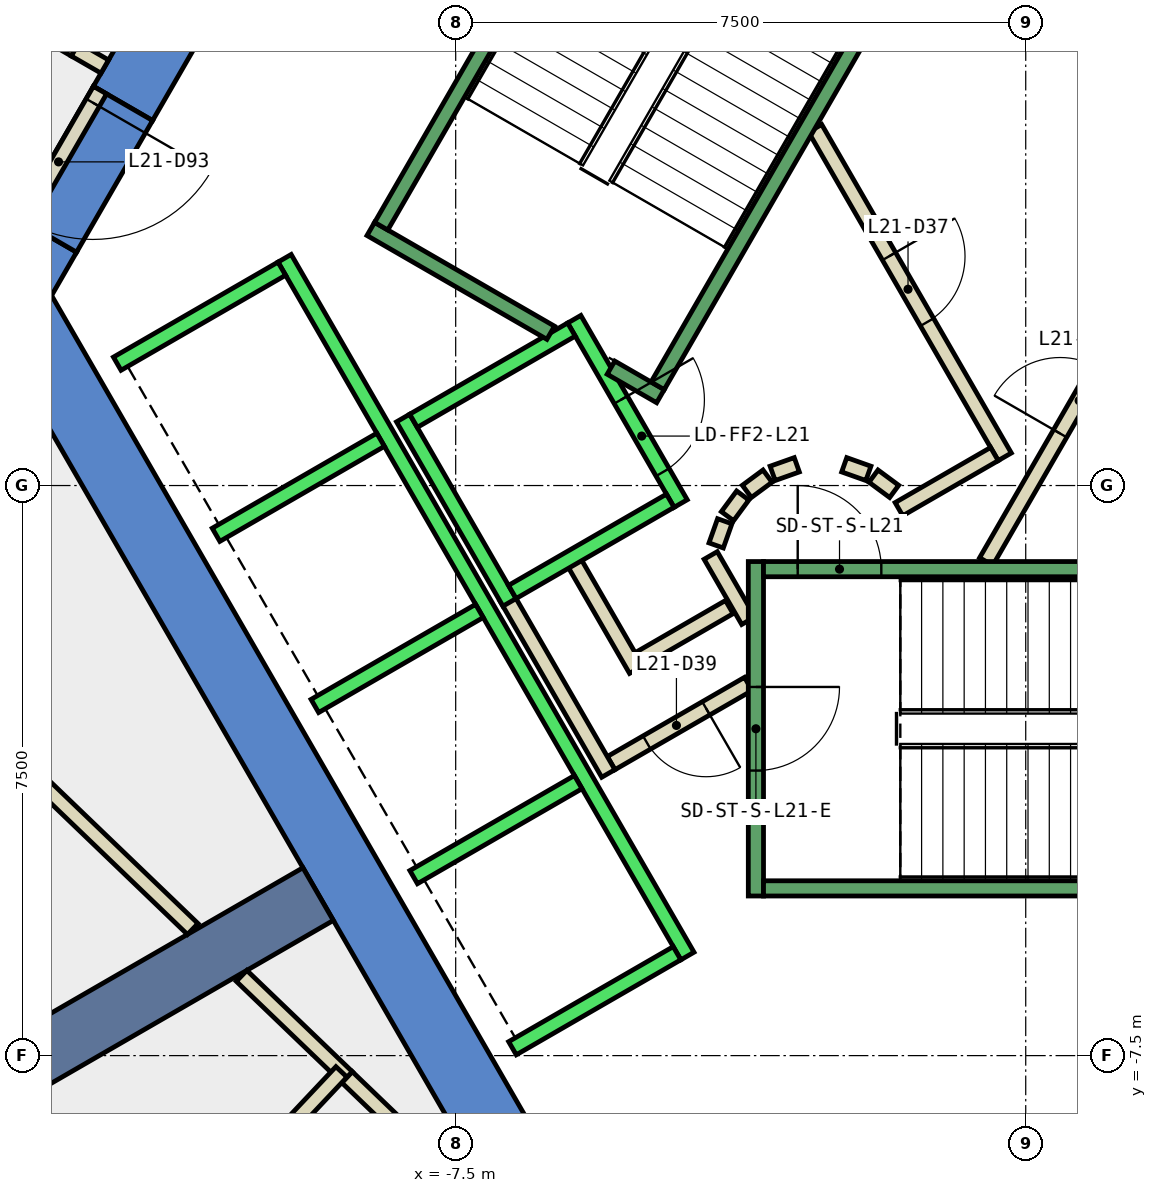
"""IFC4 building model, lengths in metres.
Left out: names, types, materials, properties, quantities, classifications, styles, units other than length and angle.
Written with IfcOpenShell. Run it as: python <this file> out.ifc"""

import sys

from ifc_helpers import new_model, si_unit, direction, frame, frame_2d, origin, place, context, subcontext, project, spatial, polyline, rectangle, outline, extrude, element, fill, save


model = new_model("IFC4")
c1 = context("Model", 3, precision=1e-05, world=origin(), true_north=direction((0.0, 1.0)))
c2 = subcontext(c1, "Body", "Model", "MODEL_VIEW")
j1 = project(units=[si_unit("LENGTHUNIT", "METRE"), si_unit("PLANEANGLEUNIT", "RADIAN")], contexts=[c1])
p1 = place(None, origin())
s1 = spatial("IfcSite", under=j1, at=p1, CompositionType="ELEMENT")
p2 = place(p1, origin())
s2 = spatial("IfcBuilding", under=s1, at=p2, CompositionType="ELEMENT")
p3 = place(p2, frame((0.0, 0.0, 99.2)))
s3 = spatial("IfcBuildingStorey", under=s2, at=p3, CompositionType="ELEMENT", Elevation=99.2)
p4 = place(p3, frame((0.0, 0.0, -0.4)))
e1 = element("IfcWall", 1, at=p4, inside=s3, PredefinedType="SHEAR", context=c2, shape_type="SweptSolid", body=[
    extrude(outline(polyline([(-12.267, 5.252), (-11.488, 4.802), (-6.409, 13.6), (-6.928, 14.5), (-12.267, 5.252)])), origin(), (0.0, 0.0, 1.0), 4.2),
])
p5 = place(p3, frame((0.0, 0.0, -0.4)))
e2 = element("IfcWall", 2, at=p5, inside=s3, PredefinedType="SHEAR", context=c2, shape_type="SweptSolid", body=[
    extrude(outline(polyline([(-12.488, 3.07), (-13.267, 3.52), (-13.856, 2.5), (-12.817, 2.5), (-12.488, 3.07)])), origin(), (0.0, 0.0, 1.0), 4.2),
])
p6 = place(p3, frame((0.0, 0.0, 3.6)))
e3 = element("IfcWall", 3, at=p6, inside=s3, PredefinedType="SHEAR", context=c2, shape_type="SweptSolid", body=[
    extrude(outline(polyline([(-13.267, 3.52), (-12.488, 3.07), (-11.488, 4.802), (-12.267, 5.252), (-13.267, 3.52)])), origin(), (0.0, 0.0, 1.0), 0.2),
])
p7 = place(p3, frame((0.0, 0.0, -0.4)))
e4 = element("IfcWall", 4, at=p7, inside=s3, PredefinedType="SHEAR", context=c2, shape_type="SweptSolid", body=[
    extrude(outline(polyline([(-13.856, 2.5), (-6.928, -9.5), (-6.409, -8.6), (-12.817, 2.5), (-13.856, 2.5)])), origin(), (0.0, 0.0, 1.0), 4.2),
])
p8 = place(p3, frame((-9.31, -5.375, -0.4), z_axis=(0.0, 0.0, 1.0), x_axis=(-0.866017533419, -0.500013631625, 0.0)))
e5 = element("IfcWall", 5, at=p8, inside=s3, PredefinedType="SHEAR", context=c2, shape_type="SweptSolid", body=[
    extrude(rectangle(XDim=9.0, YDim=0.8, at=frame_2d((4.5, 0.0))), origin(), (0.0, 0.0, 1.0), 4.2),
])
p9 = place(p3, frame((-15.835, 7.658, 0.0), z_axis=(0.0, 0.0, 1.0), x_axis=(0.866076614194, -0.499911290476, 0.0)))
e6 = element("IfcWall", 6, at=p9, inside=s3, PredefinedType="PARTITIONING", context=c2, shape_type="SweptSolid", body=[
    extrude(rectangle(XDim=3.843, YDim=0.2, at=frame_2d((1.921, 0.0))), origin(), (0.0, 0.0, 1.0), 3.8),
])
p10 = place(p9, frame((1.646, 0.0, 0.0)))
e7 = element("IfcOpeningElement", 7, at=p10, cuts=e6, PredefinedType="OPENING", context=c2, shape_type="SweptSolid", body=[
    extrude(rectangle(XDim=1.0, YDim=2.1, at=frame_2d((0.5, 1.05))), frame((0.0, 0.11, 0.0), z_axis=(0.0, -1.0, 0.0), x_axis=(1.0, 0.0, 0.0)), (0.0, 0.0, 1.0), 0.22),
])
p11 = place(p3, frame((-3.9, -1.599, 0.0), z_axis=(0.0, 0.0, 1.0), x_axis=(-0.865969445389, -0.500096910261, 0.0)))
e8 = element("IfcWall", 8, at=p11, inside=s3, PredefinedType="PARTITIONING", context=c2, shape_type="SweptSolid", body=[
    extrude(rectangle(XDim=1.373, YDim=0.2, at=frame_2d((0.687, 0.0))), origin(), (0.0, 0.0, 1.0), 3.8),
])
p12 = place(p3, frame((-5.126, -2.422, 0.0), z_axis=(0.0, 0.0, 1.0), x_axis=(-0.500062241894, 0.865989465428, 0.0)))
e9 = element("IfcWall", 9, at=p12, inside=s3, PredefinedType="PARTITIONING", context=c2, shape_type="SweptSolid", body=[
    extrude(rectangle(XDim=1.7, YDim=0.2, at=frame_2d((0.85, 0.0))), origin(), (0.0, 0.0, 1.0), 3.8),
])
p13 = place(p3, frame((-3.65, -2.61, 0.0), z_axis=(0.0, 0.0, 1.0), x_axis=(-0.866072462134, -0.499918483688, 0.0)))
e10 = element("IfcWall", 10, at=p13, inside=s3, PredefinedType="PARTITIONING", context=c2, shape_type="SweptSolid", body=[
    extrude(rectangle(XDim=2.084, YDim=0.2, at=frame_2d((1.042, 0.0))), origin(), (0.0, 0.0, 1.0), 3.8),
])
p14 = place(p13, frame((0.642, 0.0, 0.0)))
e11 = element("IfcOpeningElement", 11, at=p14, cuts=e10, PredefinedType="OPENING", context=c2, shape_type="SweptSolid", body=[
    extrude(rectangle(XDim=0.9, YDim=2.1, at=frame_2d((0.45, 1.05))), frame((0.0, 0.11, 0.0), z_axis=(0.0, -1.0, 0.0), x_axis=(1.0, 0.0, 0.0)), (0.0, 0.0, 1.0), 0.22),
])
p15 = place(p3, frame((-5.492, -3.788, 0.0), z_axis=(0.0, 0.0, 1.0), x_axis=(-0.500008949224, 0.866020236886, 0.0)))
e12 = element("IfcWall", 12, at=p15, inside=s3, PredefinedType="PARTITIONING", context=c2, shape_type="SweptSolid", body=[
    extrude(rectangle(XDim=2.68, YDim=0.2, at=frame_2d((1.34, 0.0))), origin(), (0.0, 0.0, 1.0), 3.8),
])
p16 = place(p3, frame((-4.145, -0.92, 0.0), z_axis=(0.0, 0.0, 1.0), x_axis=(0.499743786207, -0.866173278362, 0.0)))
e13 = element("IfcWall", 13, at=p16, inside=s3, PredefinedType="PARTITIONING", context=c2, shape_type="SweptSolid", body=[
    extrude(rectangle(XDim=0.991, YDim=0.2, at=frame_2d((0.495, 0.0))), origin(), (0.0, 0.0, 1.0), 3.8),
])
p17 = place(p3, frame((-0.52, -1.0, 0.0), z_axis=(0.0, 0.0, 1.0), x_axis=(0.50011622646, 0.865958290007, 0.0)))
e14 = element("IfcWall", 14, at=p17, inside=s3, PredefinedType="PARTITIONING", context=c2, shape_type="SweptSolid", body=[
    extrude(rectangle(XDim=4.991, YDim=0.2, at=frame_2d((2.496, 0.0))), origin(), (0.0, 0.0, 1.0), 3.8),
])
p18 = place(p17, frame((1.945, 0.0, 0.0)))
e15 = element("IfcOpeningElement", 15, at=p18, cuts=e14, PredefinedType="OPENING", context=c2, shape_type="SweptSolid", body=[
    extrude(rectangle(XDim=1.0, YDim=2.1, at=frame_2d((0.5, 1.05))), frame((0.0, 0.11, 0.0), z_axis=(0.0, -1.0, 0.0), x_axis=(1.0, 0.0, 0.0)), (0.0, 0.0, 1.0), 0.22),
])
p19 = place(p3, frame((-2.771, 4.7, 0.0), z_axis=(0.0, 0.0, 1.0), x_axis=(0.499969479948, -0.866043023828, 0.0)))
e16 = element("IfcWall", 16, at=p19, inside=s3, PredefinedType="PARTITIONING", context=c2, shape_type="SweptSolid", body=[
    extrude(rectangle(XDim=4.99, YDim=0.2, at=frame_2d((2.495, 0.0))), origin(), (0.0, 0.0, 1.0), 3.8),
])
p20 = place(p19, frame((1.945, 0.0, 0.0)))
e17 = element("IfcOpeningElement", 17, at=p20, cuts=e16, PredefinedType="OPENING", context=c2, shape_type="SweptSolid", body=[
    extrude(rectangle(XDim=1.0, YDim=2.1, at=frame_2d((0.5, 1.05))), frame((0.0, 0.11, 0.0), z_axis=(0.0, -1.0, 0.0), x_axis=(1.0, 0.0, 0.0)), (0.0, 0.0, 1.0), 0.22),
])
p21 = place(p3, frame((-0.412, 0.414, 0.0), z_axis=(0.0, 0.0, 1.0), x_axis=(-0.866017369001, -0.500013916395, 0.0)))
e18 = element("IfcWall", 18, at=p21, inside=s3, PredefinedType="PARTITIONING", context=c2, shape_type="SweptSolid", body=[
    extrude(rectangle(XDim=1.45, YDim=0.2, at=frame_2d((0.725, 0.0))), origin(), (0.0, 0.0, 1.0), 3.8),
])
p22 = place(p3, frame((-1.731, -0.077, 0.0), z_axis=(0.0, 0.0, 1.0), x_axis=(-0.804311165252, 0.594208338422, 0.0)))
e19 = element("IfcWall", 19, at=p22, inside=s3, PredefinedType="PARTITIONING", context=c2, shape_type="SweptSolid", body=[
    extrude(rectangle(XDim=0.338, YDim=0.2, at=frame_2d((0.169, 0.0))), origin(), (0.0, 0.0, 1.0), 3.8),
])
p23 = place(p3, frame((-2.07, 0.16, 0.0), z_axis=(0.0, 0.0, 1.0), x_axis=(-0.942199461132, 0.335052496547, 0.0)))
e20 = element("IfcWall", 20, at=p23, inside=s3, PredefinedType="PARTITIONING", context=c2, shape_type="SweptSolid", body=[
    extrude(rectangle(XDim=0.337, YDim=0.2, at=frame_2d((0.169, 0.0))), origin(), (0.0, 0.0, 1.0), 3.8),
])
p24 = place(p3, frame((-3.012, 0.273, 0.0), z_axis=(0.0, 0.0, 1.0), x_axis=(-0.942280615813, -0.334824194261, 0.0)))
e21 = element("IfcWall", 21, at=p24, inside=s3, PredefinedType="PARTITIONING", context=c2, shape_type="SweptSolid", body=[
    extrude(rectangle(XDim=0.338, YDim=0.2, at=frame_2d((0.169, 0.0))), origin(), (0.0, 0.0, 1.0), 3.8),
])
p25 = place(p3, frame((-3.397, 0.124, 0.0), z_axis=(0.0, 0.0, 1.0), x_axis=(-0.804311165252, -0.594208338422, 0.0)))
e22 = element("IfcWall", 22, at=p25, inside=s3, PredefinedType="PARTITIONING", context=c2, shape_type="SweptSolid", body=[
    extrude(rectangle(XDim=0.338, YDim=0.2, at=frame_2d((0.169, 0.0))), origin(), (0.0, 0.0, 1.0), 3.8),
])
p26 = place(p3, frame((-3.723, -0.131, 0.0), z_axis=(0.0, 0.0, 1.0), x_axis=(-0.594675113454, -0.803966112121, 0.0)))
e23 = element("IfcWall", 23, at=p26, inside=s3, PredefinedType="PARTITIONING", context=c2, shape_type="SweptSolid", body=[
    extrude(rectangle(XDim=0.338, YDim=0.2, at=frame_2d((0.169, 0.0))), origin(), (0.0, 0.0, 1.0), 3.8),
])
p27 = place(p3, frame((-3.96, -0.47, 0.0), z_axis=(0.0, 0.0, 1.0), x_axis=(-0.334824194261, -0.942280615813, 0.0)))
e24 = element("IfcWall", 24, at=p27, inside=s3, PredefinedType="PARTITIONING", context=c2, shape_type="SweptSolid", body=[
    extrude(rectangle(XDim=0.338, YDim=0.2, at=frame_2d((0.169, 0.0))), origin(), (0.0, 0.0, 1.0), 3.8),
])
p28 = place(p3, frame((-8.93, -7.783, 0.0), z_axis=(0.0, 0.0, 1.0), x_axis=(0.720954255291, -0.692982656189, 0.0)))
e25 = element("IfcWall", 25, at=p28, inside=s3, PredefinedType="PARTITIONING", context=c2, shape_type="SweptSolid", body=[
    extrude(rectangle(XDim=0.89, YDim=0.2, at=frame_2d((0.445, 0.0))), origin(), (0.0, 0.0, 1.0), 3.8),
])
p29 = place(p3, frame((-8.93, -7.783, 0.0), z_axis=(0.0, 0.0, 1.0), x_axis=(-0.72124523191, 0.692679807305, 0.0)))
e26 = element("IfcWall", 26, at=p29, inside=s3, PredefinedType="PARTITIONING", context=c2, shape_type="SweptSolid", body=[
    extrude(rectangle(XDim=1.923, YDim=0.2, at=frame_2d((0.961, 0.0))), origin(), (0.0, 0.0, 1.0), 3.8),
])
p30 = place(p3, frame((-13.865, -12.876, 0.0), z_axis=(0.0, 0.0, 1.0), x_axis=(0.685651384846, 0.727930064263, 0.0)))
e27 = element("IfcWall", 27, at=p30, inside=s3, PredefinedType="PARTITIONING", context=c2, shape_type="SweptSolid", body=[
    extrude(rectangle(XDim=7.091, YDim=0.2, at=frame_2d((3.545, 0.0))), origin(), (0.0, 0.0, 1.0), 3.8),
])
p31 = place(p3, frame((-12.18, 5.202, 0.0), z_axis=(0.0, 0.0, 1.0), x_axis=(-0.50002537861, -0.866010750942, 0.0)))
e28 = element("IfcWall", 28, at=p31, inside=s3, PredefinedType="PARTITIONING", context=c2, shape_type="SweptSolid", body=[
    extrude(rectangle(XDim=2.0, YDim=0.2, at=frame_2d((1.0, 0.0))), origin(), (0.0, 0.0, 1.0), 2.4),
])
p32 = place(p31, frame((0.19, 0.0, 0.0)))
e29 = element("IfcOpeningElement", 29, at=p32, cuts=e28, PredefinedType="OPENING", context=c2, shape_type="SweptSolid", body=[
    extrude(rectangle(XDim=1.8, YDim=2.1, at=frame_2d((0.9, 1.05))), frame((0.0, 0.11, 0.0), z_axis=(0.0, -1.0, 0.0), x_axis=(1.0, 0.0, 0.0)), (0.0, 0.0, 1.0), 0.22),
])
p33 = place(p3, frame((-10.96, -5.834, 0.0), z_axis=(0.0, 0.0, 1.0), x_axis=(-0.721236335428, 0.692689070549, 0.0)))
e30 = element("IfcWall", 30, at=p33, inside=s3, PredefinedType="PARTITIONING", context=c2, shape_type="SweptSolid", body=[
    extrude(rectangle(XDim=11.246, YDim=0.2, at=frame_2d((5.623, 0.0))), origin(), (0.0, 0.0, 1.0), 3.8),
])
p34 = place(p3, frame((-12.507, 5.737, 0.0), z_axis=(0.0, 0.0, 1.0), x_axis=(0.866167537795, -0.499753735824, 0.0)))
e31 = element("IfcWall", 31, at=p34, inside=s3, PredefinedType="PARTITIONING", context=c2, shape_type="SweptSolid", body=[
    extrude(rectangle(XDim=0.45, YDim=0.2, at=frame_2d((0.225, 0.0))), origin(), (0.0, 0.0, 1.0), 2.4),
])
p35 = place(p3, frame((-5.94, 2.188, 0.0), z_axis=(0.0, 0.0, 1.0), x_axis=(0.49994636267, -0.866056369097, 0.0)))
e32 = element("IfcWall", 32, at=p35, inside=s3, PredefinedType="STANDARD", context=c2, shape_type="SweptSolid", body=[
    extrude(rectangle(XDim=2.8, YDim=0.2, at=frame_2d((1.4, 0.0))), origin(), (0.0, 0.0, 1.0), 3.8),
])
p36 = place(p35, frame((1.225, 0.0, 0.0)))
e33 = element("IfcOpeningElement", 33, at=p36, cuts=e32, PredefinedType="OPENING", context=c2, shape_type="SweptSolid", body=[
    extrude(rectangle(XDim=1.1, YDim=2.1, at=frame_2d((0.55, 1.05))), frame((0.0, 0.11, 0.0), z_axis=(0.0, -1.0, 0.0), x_axis=(1.0, 0.0, 0.0)), (0.0, 0.0, 1.0), 0.22),
])
p37 = place(p3, frame((-8.192, 0.888, 0.0), z_axis=(0.0, 0.0, 1.0), x_axis=(0.49994636267, -0.866056369097, 0.0)))
e34 = element("IfcWall", 34, at=p37, inside=s3, PredefinedType="STANDARD", context=c2, shape_type="SweptSolid", body=[
    extrude(rectangle(XDim=2.8, YDim=0.2, at=frame_2d((1.4, 0.0))), origin(), (0.0, 0.0, 1.0), 3.8),
])
for number, where, z_axis, x_axis in (
    (35, (-5.977, 2.052, 0.0), (0.0, 0.0, 1.0), (-0.866, -0.5, 0.0)),
    (36, (-4.677, -0.2, 0.0), (0.0, 0.0, 1.0), (-0.866, -0.5, 0.0)),
):
    element("IfcWall", number, at=place(p3, frame(where, z_axis=z_axis, x_axis=x_axis)), inside=s3, PredefinedType="STANDARD", context=c2, shape_type="SweptSolid", body=[
        extrude(rectangle(XDim=2.399, YDim=0.2, at=frame_2d((1.2, 0.0))), origin(), (0.0, 0.0, 1.0), 3.8),
    ])
p38 = place(p3, frame((-9.751, 2.99, 0.0), z_axis=(0.0, 0.0, 1.0), x_axis=(0.50000090737, -0.866024879913, 0.0)))
e37 = element("IfcWall", 37, at=p38, inside=s3, PredefinedType="STANDARD", context=c2, shape_type="SweptSolid", body=[
    extrude(rectangle(XDim=10.6, YDim=0.2, at=frame_2d((5.3, 0.0))), origin(), (0.0, 0.0, 1.0), 3.8),
])
p39 = place(p3, frame((-9.788, 2.853, 0.0), z_axis=(0.0, 0.0, 1.0), x_axis=(-0.865998541277, -0.500046524342, 0.0)))
e38 = element("IfcWall", 38, at=p39, inside=s3, PredefinedType="STANDARD", context=c2, shape_type="SweptSolid", body=[
    extrude(rectangle(XDim=2.5, YDim=0.2, at=frame_2d((1.25, 0.0))), origin(), (0.0, 0.0, 1.0), 3.8),
])
for number, where, z_axis, x_axis in (
    (39, (-8.488, 0.602, 0.0), (0.0, 0.0, 1.0), (-0.866, -0.5, 0.0)),
    (40, (-7.188, -1.65, 0.0), (0.0, 0.0, 1.0), (-0.866, -0.5, 0.0)),
    (41, (-5.888, -3.902, 0.0), (0.0, 0.0, 1.0), (-0.866, -0.5, 0.0)),
    (42, (-4.588, -6.153, 0.0), (0.0, 0.0, 1.0), (-0.866, -0.5, 0.0)),
):
    element("IfcWall", number, at=place(p3, frame(where, z_axis=z_axis, x_axis=x_axis)), inside=s3, PredefinedType="STANDARD", context=c2, shape_type="SweptSolid", body=[
        extrude(rectangle(XDim=2.5, YDim=0.2, at=frame_2d((1.25, 0.0))), origin(), (0.0, 0.0, 1.0), 3.8),
    ])
p40 = place(p3, frame((-3.55, -1.0, 0.0), z_axis=(0.0, 0.0, 1.0), x_axis=(0.0, -1.0, 0.0)))
e43 = element("IfcWall", 43, at=p40, inside=s3, PredefinedType="STANDARD", context=c2, shape_type="SweptSolid", body=[
    extrude(rectangle(XDim=4.4, YDim=0.2, at=frame_2d((2.2, 0.0))), origin(), (0.0, 0.0, 1.0), 3.8),
])
p41 = place(p40, frame((1.65, 0.0, 0.0)))
e44 = element("IfcOpeningElement", 44, at=p41, cuts=e43, PredefinedType="OPENING", context=c2, shape_type="SweptSolid", body=[
    extrude(rectangle(XDim=1.1, YDim=2.2, at=frame_2d((0.55, 1.1))), frame((0.0, 0.11, 0.0), z_axis=(0.0, -1.0, 0.0), x_axis=(1.0, 0.0, 0.0)), (0.0, 0.0, 1.0), 0.22),
])
p42 = place(p3, frame((-3.45, -1.1, 0.0), z_axis=(0.0, 0.0, 1.0), x_axis=(1.0, 0.0, 0.0)))
e45 = element("IfcWall", 45, at=p42, inside=s3, PredefinedType="STANDARD", context=c2, shape_type="SweptSolid", body=[
    extrude(rectangle(XDim=6.9, YDim=0.2, at=frame_2d((3.45, 0.0))), origin(), (0.0, 0.0, 1.0), 3.8),
])
p43 = place(p42, frame((0.45, 0.0, 0.0)))
e46 = element("IfcOpeningElement", 46, at=p43, cuts=e45, PredefinedType="OPENING", context=c2, shape_type="SweptSolid", body=[
    extrude(rectangle(XDim=1.1, YDim=2.2, at=frame_2d((0.55, 1.1))), frame((0.0, 0.11, 0.0), z_axis=(0.0, -1.0, 0.0), x_axis=(1.0, 0.0, 0.0)), (0.0, 0.0, 1.0), 0.22),
])
p44 = place(p3, frame((-3.45, -5.3, 0.0), z_axis=(0.0, 0.0, 1.0), x_axis=(1.0, 0.0, 0.0)))
e47 = element("IfcWall", 47, at=p44, inside=s3, PredefinedType="STANDARD", context=c2, shape_type="SweptSolid", body=[
    extrude(rectangle(XDim=6.9, YDim=0.2, at=frame_2d((3.45, 0.0))), origin(), (0.0, 0.0, 1.0), 3.8),
])
p45 = place(p3, frame((-6.25, 2.01, 0.0), z_axis=(0.0, 0.0, 1.0), x_axis=(-0.86611865017, 0.499838457731, 0.0)))
e48 = element("IfcWall", 48, at=p45, inside=s3, PredefinedType="STANDARD", context=c2, shape_type="SweptSolid", body=[
    extrude(rectangle(XDim=2.733, YDim=0.2, at=frame_2d((1.366, 0.0))), origin(), (0.0, 0.0, 1.0), 3.8),
])
p46 = place(p3, frame((-4.806, 1.176, 0.0), z_axis=(0.0, 0.0, 1.0), x_axis=(-0.866558586415, 0.499075361355, 0.0)))
e49 = element("IfcWall", 49, at=p46, inside=s3, PredefinedType="STANDARD", context=c2, shape_type="SweptSolid", body=[
    extrude(rectangle(XDim=0.751, YDim=0.2, at=frame_2d((0.376, 0.0))), origin(), (0.0, 0.0, 1.0), 3.8),
])
p47 = place(p3, frame((-1.393, 7.288, 0.0), z_axis=(0.0, 0.0, 1.0), x_axis=(-0.499963383562, -0.866046543262, 0.0)))
e50 = element("IfcWall", 50, at=p47, inside=s3, PredefinedType="STANDARD", context=c2, shape_type="SweptSolid", body=[
    extrude(rectangle(XDim=6.9, YDim=0.2, at=frame_2d((3.45, 0.0))), origin(), (0.0, 0.0, 1.0), 3.8),
])
p48 = place(p47, frame((0.45, 0.0, 0.0)))
e51 = element("IfcOpeningElement", 51, at=p48, cuts=e50, PredefinedType="OPENING", context=c2, shape_type="SweptSolid", body=[
    extrude(rectangle(XDim=1.1, YDim=2.2, at=frame_2d((0.55, 1.1))), frame((0.0, 0.11, 0.0), z_axis=(0.0, -1.0, 0.0), x_axis=(1.0, 0.0, 0.0)), (0.0, 0.0, 1.0), 0.22),
])
p49 = place(p3, frame((-5.03, 9.388, 0.0), z_axis=(0.0, 0.0, 1.0), x_axis=(-0.499978703459, -0.866037698999, 0.0)))
e52 = element("IfcWall", 52, at=p49, inside=s3, PredefinedType="STANDARD", context=c2, shape_type="SweptSolid", body=[
    extrude(rectangle(XDim=6.9, YDim=0.2, at=frame_2d((3.45, 0.0))), origin(), (0.0, 0.0, 1.0), 3.8),
])
p50 = place(p18, origin())
e53 = element("IfcDoor", 53, at=p50, inside=s3, OperationType="SINGLE_SWING_LEFT", PredefinedType="DOOR", context=c2, shape_type="SweptSolid", body=[
    extrude(rectangle(XDim=1.0, YDim=2.1, at=frame_2d((0.5, 1.05))), frame((0.0, 0.025, 0.0), z_axis=(0.0, -1.0, 0.0), x_axis=(1.0, 0.0, 0.0)), (0.0, 0.0, 1.0), 0.05),
])
fill(e15, e53)
p51 = place(p20, origin())
e54 = element("IfcDoor", 54, at=p51, inside=s3, OperationType="SINGLE_SWING_RIGHT", PredefinedType="DOOR", context=c2, shape_type="SweptSolid", body=[
    extrude(rectangle(XDim=1.0, YDim=2.1, at=frame_2d((0.5, 1.05))), frame((0.0, 0.025, 0.0), z_axis=(0.0, -1.0, 0.0), x_axis=(1.0, 0.0, 0.0)), (0.0, 0.0, 1.0), 0.05),
])
fill(e17, e54)
p52 = place(p14, origin())
e55 = element("IfcDoor", 55, at=p52, inside=s3, OperationType="SINGLE_SWING_LEFT", PredefinedType="DOOR", context=c2, shape_type="SweptSolid", body=[
    extrude(rectangle(XDim=0.9, YDim=2.1, at=frame_2d((0.45, 1.05))), frame((0.0, 0.025, 0.0), z_axis=(0.0, -1.0, 0.0), x_axis=(1.0, 0.0, 0.0)), (0.0, 0.0, 1.0), 0.05),
])
fill(e11, e55)
p53 = place(p32, origin())
e56 = element("IfcDoor", 56, at=p53, inside=s3, OperationType="DOUBLE_DOOR_SINGLE_SWING", PredefinedType="DOOR", context=c2, shape_type="SweptSolid", body=[
    extrude(rectangle(XDim=1.8, YDim=2.1, at=frame_2d((0.9, 1.05))), frame((0.0, 0.025, 0.0), z_axis=(0.0, -1.0, 0.0), x_axis=(1.0, 0.0, 0.0)), (0.0, 0.0, 1.0), 0.05),
])
fill(e29, e56)
p54 = place(p36, origin())
e57 = element("IfcDoor", 57, at=p54, inside=s3, OperationType="SLIDING_TO_LEFT", PredefinedType="DOOR", context=c2, shape_type="SweptSolid", body=[
    extrude(rectangle(XDim=1.1, YDim=2.1, at=frame_2d((0.55, 1.05))), frame((0.0, 0.025, 0.0), z_axis=(0.0, -1.0, 0.0), x_axis=(1.0, 0.0, 0.0)), (0.0, 0.0, 1.0), 0.05),
])
fill(e33, e57)
p55 = place(p43, origin())
e58 = element("IfcDoor", 58, at=p55, inside=s3, OperationType="SINGLE_SWING_LEFT", PredefinedType="DOOR", context=c2, shape_type="SweptSolid", body=[
    extrude(rectangle(XDim=1.1, YDim=2.2, at=frame_2d((0.55, 1.1))), frame((0.0, 0.025, 0.0), z_axis=(0.0, -1.0, 0.0), x_axis=(1.0, 0.0, 0.0)), (0.0, 0.0, 1.0), 0.05),
])
fill(e46, e58)
p56 = place(p41, origin())
e59 = element("IfcDoor", 59, at=p56, inside=s3, OperationType="SINGLE_SWING_LEFT", PredefinedType="DOOR", context=c2, shape_type="SweptSolid", body=[
    extrude(rectangle(XDim=1.1, YDim=2.2, at=frame_2d((0.55, 1.1))), frame((0.0, 0.025, 0.0), z_axis=(0.0, -1.0, 0.0), x_axis=(1.0, 0.0, 0.0)), (0.0, 0.0, 1.0), 0.05),
])
fill(e44, e59)
save(model, sys.argv[1])
